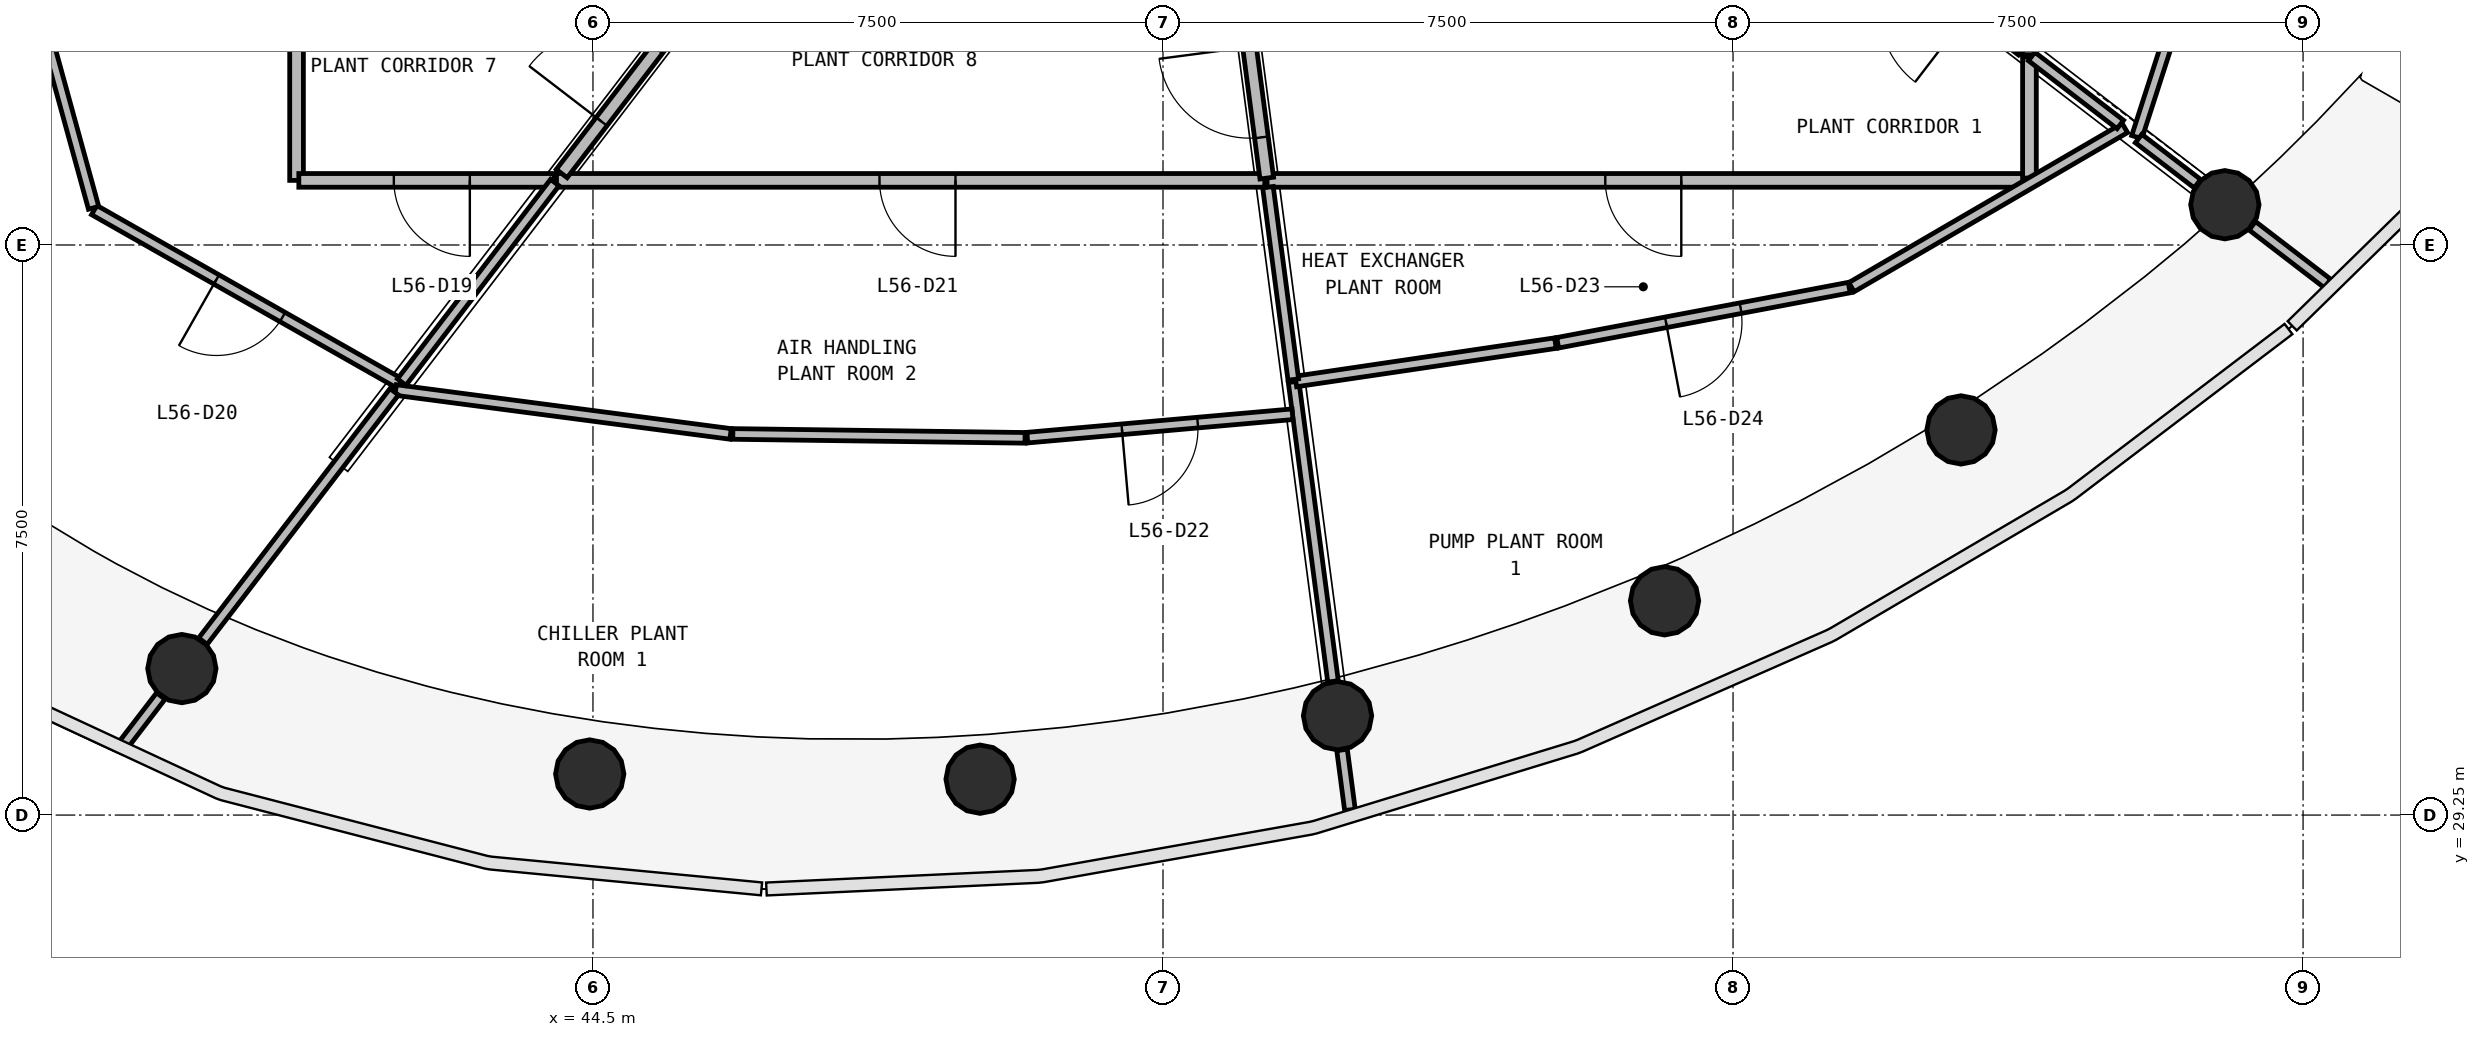
"""IFC4 building model, lengths in metres.
Left out: names, types, materials, properties, quantities, classifications, styles, units other than length and angle.
Written with IfcOpenShell. Run it as: python <this file> out.ifc"""

import sys

from ifc_helpers import new_model, si_unit, direction, frame, frame_2d, origin, origin_2d, place, context, subcontext, project, spatial, rectangle, circle, extrude, source, transform, mapped, element, fill, save


model = new_model("IFC4")
c1 = context("Model", 3, precision=1e-05, world=origin(), true_north=direction((0.0, 1.0)))
c2 = subcontext(c1, "Body", "Model", "MODEL_VIEW")
j1 = project(units=[si_unit("LENGTHUNIT", "METRE"), si_unit("PLANEANGLEUNIT", "RADIAN")], contexts=[c1])
p1 = place(None, origin())
s1 = spatial("IfcSite", under=j1, at=p1, CompositionType="ELEMENT")
p2 = place(p1, origin())
s2 = spatial("IfcBuilding", under=s1, at=p2, CompositionType="ELEMENT")
p3 = place(p2, frame((0.0, 0.0, 230.6)))
s3 = spatial("IfcBuildingStorey", under=s2, at=p3, CompositionType="ELEMENT", Elevation=230.6)
m1 = source(origin(), c2, "Body", "SweptSolid", [
    extrude(circle(Radius=0.45, at=origin_2d()), origin(), (0.0, 0.0, 1.0), 3.58),
])
for number, where, z_axis, x_axis in (
    (1, (39.091, 31.177, 0.0), (0.0, 0.0, 1.0), (1.0, 0.0, 0.0)),
    (2, (44.457, 29.79, 0.0), (0.0, 0.0, 1.0), (1.0, 0.0, 0.0)),
    (3, (49.594, 29.722, 0.0), (0.0, 0.0, 1.0), (1.0, 0.0, 0.0)),
    (4, (54.296, 30.558, 0.0), (0.0, 0.0, 1.0), (1.0, 0.0, 0.0)),
    (5, (58.599, 32.069, 0.0), (0.0, 0.0, 1.0), (1.0, 0.0, 0.0)),
    (6, (62.499, 34.317, 0.0), (0.0, 0.0, 1.0), (1.0, 0.0, 0.0)),
    (7, (65.971, 37.28, 0.0), (0.0, 0.0, 1.0), (1.0, 0.0, 0.0)),
):
    element("IfcColumn", number, at=place(p3, frame(where, z_axis=z_axis, x_axis=x_axis)), inside=s3, PredefinedType="COLUMN", context=c2, shape_type="MappedRepresentation", body=[
        mapped(m1, transform((0.0, 0.0, 0.0), scale=1.0)),
    ])
p4 = place(p3, frame((63.4, 49.501, 0.0), z_axis=(0.0, 0.0, 1.0), x_axis=(0.0, -1.0, 0.0)))
e8 = element("IfcWall", 8, at=p4, inside=s3, PredefinedType="PARTITIONING", context=c2, shape_type="SweptSolid", body=[
    extrude(rectangle(XDim=10.248, YDim=0.18, at=frame_2d((5.124, 0.0))), origin(), (0.0, 0.0, 1.0), 2.38),
])
p5 = place(p4, frame((4.598, 0.0, 0.0)))
e9 = element("IfcOpeningElement", 9, at=p5, cuts=e8, PredefinedType="OPENING", context=c2, shape_type="SweptSolid", body=[
    extrude(rectangle(XDim=1.0, YDim=2.1, at=frame_2d((0.5, 1.05))), frame((0.0, 0.1, 0.0), z_axis=(0.0, -1.0, 0.0), x_axis=(1.0, 0.0, 0.0)), (0.0, 0.0, 1.0), 0.2),
])
p6 = place(p3, frame((63.4, 37.6, 0.0), z_axis=(0.0, 0.0, 1.0), x_axis=(-1.0, 0.0, 0.0)))
e10 = element("IfcWall", 10, at=p6, inside=s3, PredefinedType="PARTITIONING", context=c2, shape_type="SweptSolid", body=[
    extrude(rectangle(XDim=10.031, YDim=0.18, at=frame_2d((5.015, 0.0))), origin(), (0.0, 0.0, 1.0), 2.38),
])
p7 = place(p6, frame((4.581, 0.0, 0.0)))
e11 = element("IfcOpeningElement", 11, at=p7, cuts=e10, PredefinedType="OPENING", context=c2, shape_type="SweptSolid", body=[
    extrude(rectangle(XDim=1.0, YDim=2.1, at=frame_2d((0.5, 1.05))), frame((0.0, 0.1, 0.0), z_axis=(0.0, -1.0, 0.0), x_axis=(1.0, 0.0, 0.0)), (0.0, 0.0, 1.0), 0.2),
])
p8 = place(p3, frame((53.339, 37.6, 0.0), z_axis=(0.0, 0.0, 1.0), x_axis=(-1.0, 0.0, 0.0)))
e12 = element("IfcWall", 12, at=p8, inside=s3, PredefinedType="PARTITIONING", context=c2, shape_type="SweptSolid", body=[
    extrude(rectangle(XDim=9.319, YDim=0.18, at=frame_2d((4.66, 0.0))), origin(), (0.0, 0.0, 1.0), 2.38),
])
p9 = place(p8, frame((4.069, 0.0, 0.0)))
e13 = element("IfcOpeningElement", 13, at=p9, cuts=e12, PredefinedType="OPENING", context=c2, shape_type="SweptSolid", body=[
    extrude(rectangle(XDim=1.0, YDim=2.1, at=frame_2d((0.5, 1.05))), frame((0.0, 0.1, 0.0), z_axis=(0.0, -1.0, 0.0), x_axis=(1.0, 0.0, 0.0)), (0.0, 0.0, 1.0), 0.2),
])
p10 = place(p3, frame((40.6, 46.469, 0.0), z_axis=(0.0, 0.0, 1.0), x_axis=(0.0, -1.0, 0.0)))
e14 = element("IfcWall", 14, at=p10, inside=s3, PredefinedType="PARTITIONING", context=c2, shape_type="SweptSolid", body=[
    extrude(rectangle(XDim=8.869, YDim=0.18, at=frame_2d((4.435, 0.0))), origin(), (0.0, 0.0, 1.0), 2.38),
])
p11 = place(p3, frame((43.99, 37.6, 0.0), z_axis=(0.0, 0.0, 1.0), x_axis=(-1.0, 0.0, 0.0)))
e15 = element("IfcWall", 15, at=p11, inside=s3, PredefinedType="PARTITIONING", context=c2, shape_type="SweptSolid", body=[
    extrude(rectangle(XDim=3.36, YDim=0.18, at=frame_2d((1.68, 0.0))), origin(), (0.0, 0.0, 1.0), 2.38),
])
p12 = place(p11, frame((1.11, 0.0, 0.0)))
e16 = element("IfcOpeningElement", 16, at=p12, cuts=e15, PredefinedType="OPENING", context=c2, shape_type="SweptSolid", body=[
    extrude(rectangle(XDim=1.0, YDim=2.1, at=frame_2d((0.5, 1.05))), frame((0.0, 0.1, 0.0), z_axis=(0.0, -1.0, 0.0), x_axis=(1.0, 0.0, 0.0)), (0.0, 0.0, 1.0), 0.2),
])
p13 = place(p3, frame((44.089, 37.69, 0.0), z_axis=(0.0, 0.0, 1.0), x_axis=(0.608737787706, 0.793371480341, 0.0)))
e17 = element("IfcWall", 17, at=p13, inside=s3, PredefinedType="PARTITIONING", context=c2, shape_type="SweptSolid", body=[
    extrude(rectangle(XDim=2.912, YDim=0.18, at=frame_2d((1.456, 0.0))), origin(), (0.0, 0.0, 1.0), 2.38),
])
p14 = place(p13, frame((0.862, 0.0, 0.0)))
e18 = element("IfcOpeningElement", 18, at=p14, cuts=e17, PredefinedType="OPENING", context=c2, shape_type="SweptSolid", body=[
    extrude(rectangle(XDim=1.2, YDim=2.1, at=frame_2d((0.6, 1.05))), frame((0.0, 0.1, 0.0), z_axis=(0.0, -1.0, 0.0), x_axis=(1.0, 0.0, 0.0)), (0.0, 0.0, 1.0), 0.2),
])
p15 = place(p3, frame((63.31, 39.322, 0.0), z_axis=(0.0, 0.0, 1.0), x_axis=(-0.793371480341, 0.608737787706, 0.0)))
e19 = element("IfcWall", 19, at=p15, inside=s3, PredefinedType="PARTITIONING", context=c2, shape_type="SweptSolid", body=[
    extrude(rectangle(XDim=2.912, YDim=0.18, at=frame_2d((1.456, 0.0))), origin(), (0.0, 0.0, 1.0), 2.38),
])
p16 = place(p15, frame((0.862, 0.0, 0.0)))
e20 = element("IfcOpeningElement", 20, at=p16, cuts=e19, PredefinedType="OPENING", context=c2, shape_type="SweptSolid", body=[
    extrude(rectangle(XDim=1.2, YDim=2.1, at=frame_2d((0.6, 1.05))), frame((0.0, 0.1, 0.0), z_axis=(0.0, -1.0, 0.0), x_axis=(1.0, 0.0, 0.0)), (0.0, 0.0, 1.0), 0.2),
])
p17 = place(p3, frame((53.365, 37.63, 0.0), z_axis=(0.0, 0.0, 1.0), x_axis=(-0.130504701654, 0.991447690424, 0.0)))
e21 = element("IfcWall", 21, at=p17, inside=s3, PredefinedType="PARTITIONING", context=c2, shape_type="SweptSolid", body=[
    extrude(rectangle(XDim=2.391, YDim=0.18, at=frame_2d((1.195, 0.0))), origin(), (0.0, 0.0, 1.0), 2.38),
])
p18 = place(p17, frame((0.541, 0.0, 0.0)))
e22 = element("IfcOpeningElement", 22, at=p18, cuts=e21, PredefinedType="OPENING", context=c2, shape_type="SweptSolid", body=[
    extrude(rectangle(XDim=1.2, YDim=2.1, at=frame_2d((0.6, 1.05))), frame((0.0, 0.1, 0.0), z_axis=(0.0, -1.0, 0.0), x_axis=(1.0, 0.0, 0.0)), (0.0, 0.0, 1.0), 0.2),
])
p19 = place(p3, frame((63.4, 37.63, 0.0), z_axis=(0.0, 0.0, 1.0), x_axis=(0.0, 1.0, 0.0)))
e23 = element("IfcWall", 23, at=p19, inside=s3, PredefinedType="PARTITIONING", context=c2, shape_type="SweptSolid", body=[
    extrude(rectangle(XDim=1.593, YDim=0.18, at=frame_2d((0.796, 0.0))), origin(), (0.0, 0.0, 1.0), 2.38),
])
p20 = place(p3, frame((41.965, 34.923, 0.0), z_axis=(0.0, 0.0, 1.0), x_axis=(-0.869576423492, 0.493798383662, 0.0)))
e24 = element("IfcWall", 24, at=p20, inside=s3, PredefinedType="PARTITIONING", context=c2, shape_type="SweptSolid", body=[
    extrude(rectangle(XDim=4.632, YDim=0.14, at=frame_2d((2.316, 0.0))), origin(), (0.0, 0.0, 1.0), 2.38),
])
p21 = place(p20, frame((1.781, 0.0, 0.0)))
e25 = element("IfcOpeningElement", 25, at=p21, cuts=e24, PredefinedType="OPENING", context=c2, shape_type="SweptSolid", body=[
    extrude(rectangle(XDim=1.0, YDim=2.1, at=frame_2d((0.5, 1.05))), frame((0.0, 0.08, 0.0), z_axis=(0.0, -1.0, 0.0), x_axis=(1.0, 0.0, 0.0)), (0.0, 0.0, 1.0), 0.16),
])
p22 = place(p3, frame((36.712, 41.668, 0.0), z_axis=(0.0, 0.0, 1.0), x_axis=(0.265005769804, -0.964246826269, 0.0)))
e26 = element("IfcWall", 26, at=p22, inside=s3, PredefinedType="PARTITIONING", context=c2, shape_type="SweptSolid", body=[
    extrude(rectangle(XDim=4.594, YDim=0.14, at=frame_2d((2.297, 0.0))), origin(), (0.0, 0.0, 1.0), 2.38),
])
p23 = place(p3, frame((41.904, 34.842, 0.0), z_axis=(0.0, 0.0, 1.0), x_axis=(0.991511039877, -0.130022528055, 0.0)))
e27 = element("IfcWall", 27, at=p23, inside=s3, PredefinedType="PARTITIONING", context=c2, shape_type="SweptSolid", body=[
    extrude(rectangle(XDim=4.445, YDim=0.14, at=frame_2d((2.222, 0.0))), origin(), (0.0, 0.0, 1.0), 2.38),
])
p24 = place(p3, frame((39.368, 31.538, 0.0), z_axis=(0.0, 0.0, 1.0), x_axis=(0.608757438712, 0.793356402138, 0.0)))
e28 = element("IfcWall", 28, at=p24, inside=s3, PredefinedType="PARTITIONING", context=c2, shape_type="SweptSolid", body=[
    extrude(rectangle(XDim=4.135, YDim=0.14, at=frame_2d((2.068, 0.0))), origin(), (0.0, 0.0, 1.0), 2.38),
])
p25 = place(p3, frame((64.812, 38.169, 0.0), z_axis=(0.0, 0.0, 1.0), x_axis=(0.306815660153, 0.951768958668, 0.0)))
e29 = element("IfcWall", 29, at=p25, inside=s3, PredefinedType="PARTITIONING", context=c2, shape_type="SweptSolid", body=[
    extrude(rectangle(XDim=4.193, YDim=0.14, at=frame_2d((2.097, 0.0))), origin(), (0.0, 0.0, 1.0), 2.38),
])
p26 = place(p3, frame((61.058, 36.195, 0.0), z_axis=(0.0, 0.0, 1.0), x_axis=(0.864208311026, 0.503134172118, 0.0)))
e30 = element("IfcWall", 30, at=p26, inside=s3, PredefinedType="PARTITIONING", context=c2, shape_type="SweptSolid", body=[
    extrude(rectangle(XDim=4.162, YDim=0.14, at=frame_2d((2.081, 0.0))), origin(), (0.0, 0.0, 1.0), 2.38),
])
p27 = place(p3, frame((53.718, 34.95, 0.0), z_axis=(0.0, 0.0, 1.0), x_axis=(0.130554588204, -0.991441122558, 0.0)))
e31 = element("IfcWall", 31, at=p27, inside=s3, PredefinedType="PARTITIONING", context=c2, shape_type="SweptSolid", body=[
    extrude(rectangle(XDim=3.976, YDim=0.14, at=frame_2d((1.988, 0.0))), origin(), (0.0, 0.0, 1.0), 2.38),
])
p28 = place(p3, frame((61.029, 36.189, 0.0), z_axis=(0.0, 0.0, 1.0), x_axis=(-0.982553571564, -0.185979781176, 0.0)))
e32 = element("IfcWall", 32, at=p28, inside=s3, PredefinedType="PARTITIONING", context=c2, shape_type="SweptSolid", body=[
    extrude(rectangle(XDim=3.904, YDim=0.14, at=frame_2d((1.952, 0.0))), origin(), (0.0, 0.0, 1.0), 2.38),
])
p29 = place(p28, frame((1.454, 0.0, 0.0)))
e33 = element("IfcOpeningElement", 33, at=p29, cuts=e32, PredefinedType="OPENING", context=c2, shape_type="SweptSolid", body=[
    extrude(rectangle(XDim=1.0, YDim=2.1, at=frame_2d((0.5, 1.05))), frame((0.0, 0.08, 0.0), z_axis=(0.0, -1.0, 0.0), x_axis=(1.0, 0.0, 0.0)), (0.0, 0.0, 1.0), 0.16),
])
p30 = place(p3, frame((46.34, 34.264, 0.0), z_axis=(0.0, 0.0, 1.0), x_axis=(0.999911089098, -0.013334687795, 0.0)))
e34 = element("IfcWall", 34, at=p30, inside=s3, PredefinedType="PARTITIONING", context=c2, shape_type="SweptSolid", body=[
    extrude(rectangle(XDim=3.845, YDim=0.14, at=frame_2d((1.922, 0.0))), origin(), (0.0, 0.0, 1.0), 2.38),
])
p31 = place(p3, frame((53.704, 34.523, 0.0), z_axis=(0.0, 0.0, 1.0), x_axis=(-0.996129131969, -0.087901947894, 0.0)))
e35 = element("IfcWall", 35, at=p31, inside=s3, PredefinedType="PARTITIONING", context=c2, shape_type="SweptSolid", body=[
    extrude(rectangle(XDim=3.502, YDim=0.14, at=frame_2d((1.751, 0.0))), origin(), (0.0, 0.0, 1.0), 2.38),
])
p32 = place(p31, frame((1.252, 0.0, 0.0)))
e36 = element("IfcOpeningElement", 36, at=p32, cuts=e35, PredefinedType="OPENING", context=c2, shape_type="SweptSolid", body=[
    extrude(rectangle(XDim=1.0, YDim=2.1, at=frame_2d((0.5, 1.05))), frame((0.0, 0.08, 0.0), z_axis=(0.0, -1.0, 0.0), x_axis=(1.0, 0.0, 0.0)), (0.0, 0.0, 1.0), 0.16),
])
p33 = place(p3, frame((53.748, 34.954, 0.0), z_axis=(0.0, 0.0, 1.0), x_axis=(0.989248976664, 0.146241109711, 0.0)))
e37 = element("IfcWall", 37, at=p33, inside=s3, PredefinedType="PARTITIONING", context=c2, shape_type="SweptSolid", body=[
    extrude(rectangle(XDim=3.452, YDim=0.14, at=frame_2d((1.726, 0.0))), origin(), (0.0, 0.0, 1.0), 2.38),
])
p34 = place(p3, frame((41.983, 34.946, 0.0), z_axis=(0.0, 0.0, 1.0), x_axis=(0.608783144395, 0.793336677017, 0.0)))
e38 = element("IfcWall", 38, at=p34, inside=s3, PredefinedType="PARTITIONING", context=c2, shape_type="SweptSolid", body=[
    extrude(rectangle(XDim=3.309, YDim=0.14, at=frame_2d((1.654, 0.0))), origin(), (0.0, 0.0, 1.0), 2.38),
])
p35 = place(p3, frame((53.381, 37.51, 0.0), z_axis=(0.0, 0.0, 1.0), x_axis=(0.130471833124, -0.991452016369, 0.0)))
e39 = element("IfcWall", 39, at=p35, inside=s3, PredefinedType="PARTITIONING", context=c2, shape_type="SweptSolid", body=[
    extrude(rectangle(XDim=2.552, YDim=0.14, at=frame_2d((1.276, 0.0))), origin(), (0.0, 0.0, 1.0), 2.38),
])
p36 = place(p3, frame((63.429, 39.23, 0.0), z_axis=(0.0, 0.0, 1.0), x_axis=(0.793395131444, -0.608706961847, 0.0)))
e40 = element("IfcWall", 40, at=p36, inside=s3, PredefinedType="PARTITIONING", context=c2, shape_type="SweptSolid", body=[
    extrude(rectangle(XDim=1.47, YDim=0.14, at=frame_2d((0.735, 0.0))), origin(), (0.0, 0.0, 1.0), 2.38),
])
p37 = place(p3, frame((66.332, 37.003, 0.0), z_axis=(0.0, 0.0, 1.0), x_axis=(0.793408114576, -0.608690039121, 0.0)))
e41 = element("IfcWall", 41, at=p37, inside=s3, PredefinedType="PARTITIONING", context=c2, shape_type="SweptSolid", body=[
    extrude(rectangle(XDim=1.249, YDim=0.14, at=frame_2d((0.625, 0.0))), origin(), (0.0, 0.0, 1.0), 2.88),
])
p38 = place(p3, frame((64.836, 38.151, 0.0), z_axis=(0.0, 0.0, 1.0), x_axis=(0.793348654177, -0.608767536023, 0.0)))
e42 = element("IfcWall", 42, at=p38, inside=s3, PredefinedType="PARTITIONING", context=c2, shape_type="SweptSolid", body=[
    extrude(rectangle(XDim=0.976, YDim=0.14, at=frame_2d((0.488, 0.0))), origin(), (0.0, 0.0, 1.0), 2.38),
])
p39 = place(p3, frame((38.814, 30.816, 0.0), z_axis=(0.0, 0.0, 1.0), x_axis=(-0.608636710057, -0.793449024936, 0.0)))
e43 = element("IfcWall", 43, at=p39, inside=s3, PredefinedType="PARTITIONING", context=c2, shape_type="SweptSolid", body=[
    extrude(rectangle(XDim=0.824, YDim=0.14, at=frame_2d((0.412, 0.0))), origin(), (0.0, 0.0, 1.0), 2.88),
])
p40 = place(p3, frame((54.356, 30.107, 0.0), z_axis=(0.0, 0.0, 1.0), x_axis=(0.130414823496, -0.991459516981, 0.0)))
e44 = element("IfcWall", 44, at=p40, inside=s3, PredefinedType="PARTITIONING", context=c2, shape_type="SweptSolid", body=[
    extrude(rectangle(XDim=0.796, YDim=0.14, at=frame_2d((0.398, 0.0))), origin(), (0.0, 0.0, 1.0), 2.88),
])
m2 = source(origin(), c2, "Body", "SweptSolid", [
    extrude(rectangle(XDim=1.0, YDim=2.1, at=frame_2d((0.5, 1.05))), frame((0.0, 0.025, 0.0), z_axis=(0.0, -1.0, 0.0), x_axis=(1.0, 0.0, 0.0)), (0.0, 0.0, 1.0), 0.05),
])
p41 = place(p12, origin())
e45 = element("IfcDoor", 45, at=p41, inside=s3, OperationType="SINGLE_SWING_LEFT", PredefinedType="DOOR", context=c2, shape_type="MappedRepresentation", body=[
    mapped(m2, transform((0.0, 0.0, 0.0), scale=1.0)),
])
fill(e16, e45)
p42 = place(p21, origin())
e46 = element("IfcDoor", 46, at=p42, inside=s3, OperationType="SINGLE_SWING_RIGHT", PredefinedType="DOOR", context=c2, shape_type="MappedRepresentation", body=[
    mapped(m2, transform((0.0, 0.0, 0.0), scale=1.0)),
])
fill(e25, e46)
p43 = place(p9, origin())
e47 = element("IfcDoor", 47, at=p43, inside=s3, OperationType="SINGLE_SWING_LEFT", PredefinedType="DOOR", context=c2, shape_type="MappedRepresentation", body=[
    mapped(m2, transform((0.0, 0.0, 0.0), scale=1.0)),
])
fill(e13, e47)
p44 = place(p32, origin())
e48 = element("IfcDoor", 48, at=p44, inside=s3, OperationType="SINGLE_SWING_RIGHT", PredefinedType="DOOR", context=c2, shape_type="MappedRepresentation", body=[
    mapped(m2, transform((0.0, 0.0, 0.0), scale=1.0)),
])
fill(e36, e48)
p45 = place(p7, origin())
e49 = element("IfcDoor", 49, at=p45, inside=s3, OperationType="SINGLE_SWING_LEFT", PredefinedType="DOOR", context=c2, shape_type="MappedRepresentation", body=[
    mapped(m2, transform((0.0, 0.0, 0.0), scale=1.0)),
])
fill(e11, e49)
p46 = place(p29, origin())
e50 = element("IfcDoor", 50, at=p46, inside=s3, OperationType="SINGLE_SWING_RIGHT", PredefinedType="DOOR", context=c2, shape_type="MappedRepresentation", body=[
    mapped(m2, transform((0.0, 0.0, 0.0), scale=1.0)),
])
fill(e33, e50)
m3 = source(origin(), c2, "Body", "SweptSolid", [
    extrude(rectangle(XDim=1.2, YDim=2.1, at=frame_2d((0.6, 1.05))), frame((0.0, 0.025, 0.0), z_axis=(0.0, -1.0, 0.0), x_axis=(1.0, 0.0, 0.0)), (0.0, 0.0, 1.0), 0.05),
])
p47 = place(p14, origin())
e51 = element("IfcDoor", 51, at=p47, inside=s3, OperationType="SINGLE_SWING_LEFT", PredefinedType="DOOR", context=c2, shape_type="MappedRepresentation", body=[
    mapped(m3, transform((0.0, 0.0, 0.0), scale=1.0)),
])
fill(e18, e51)
p48 = place(p18, origin())
e52 = element("IfcDoor", 52, at=p48, inside=s3, OperationType="SINGLE_SWING_RIGHT", PredefinedType="DOOR", context=c2, shape_type="MappedRepresentation", body=[
    mapped(m3, transform((0.0, 0.0, 0.0), scale=1.0)),
])
fill(e22, e52)
save(model, sys.argv[1])
